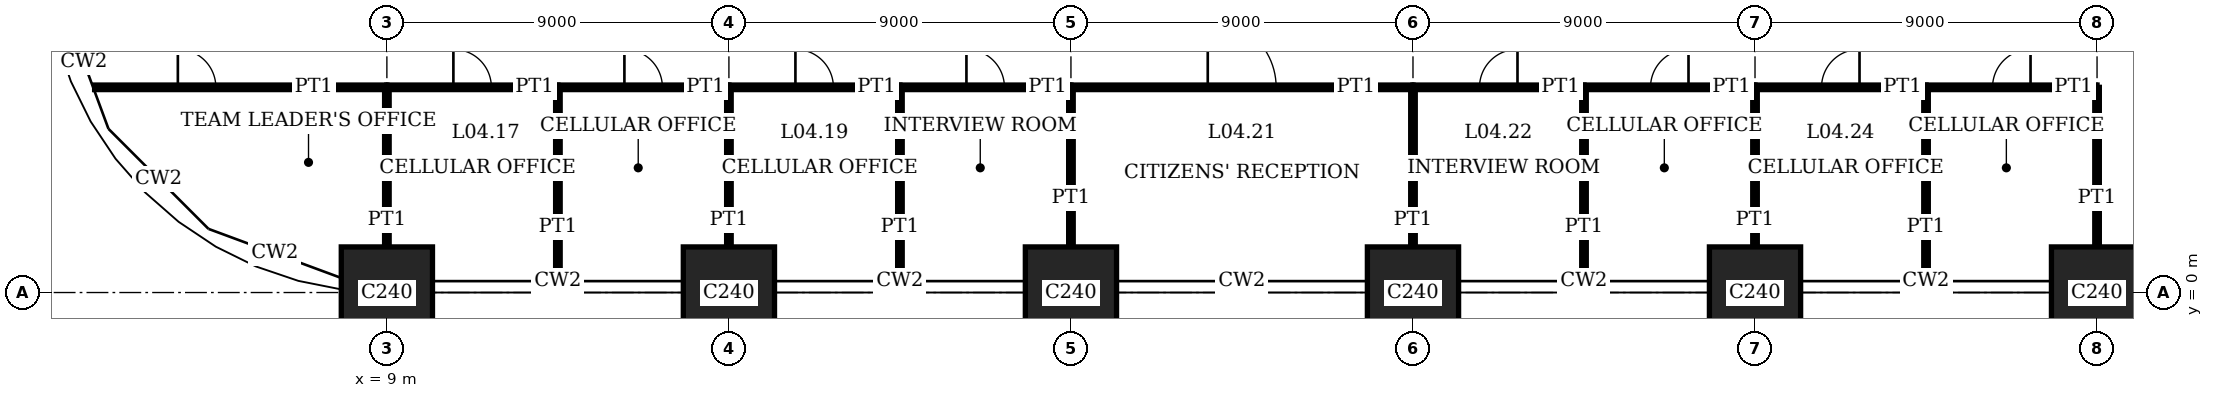
"""IFC4 building model, lengths in metres.
Left out: names, types, materials, properties, quantities, classifications, styles, units other than length and angle.
Written with IfcOpenShell. Run it as: python <this file> out.ifc"""

import sys

from ifc_helpers import new_model, si_unit, direction, frame, frame_2d, origin, origin_2d, place, context, subcontext, project, spatial, rectangle, extrude, element, fill, save


model = new_model("IFC4")
c1 = context("Model", 3, precision=1e-05, world=origin(), true_north=direction((0.0, 1.0)))
c2 = subcontext(c1, "Body", "Model", "MODEL_VIEW")
j1 = project(units=[si_unit("LENGTHUNIT", "METRE"), si_unit("PLANEANGLEUNIT", "RADIAN")], contexts=[c1])
p1 = place(None, origin())
s1 = spatial("IfcSite", under=j1, at=p1, CompositionType="ELEMENT")
p2 = place(p1, origin())
s2 = spatial("IfcBuilding", under=s1, at=p2, CompositionType="ELEMENT")
p3 = place(p2, frame((0.0, 0.0, 19.8)))
s3 = spatial("IfcBuildingStorey", under=s2, at=p3, CompositionType="ELEMENT", Elevation=19.8)
for number, where, z_axis, x_axis in (
    (1, (9.0, 0.0, 0.0), (0.0, 0.0, 1.0), (1.0, 0.0, 0.0)),
    (2, (18.0, 0.0, 0.0), (0.0, 0.0, 1.0), (1.0, 0.0, 0.0)),
    (3, (27.0, 0.0, 0.0), (0.0, 0.0, 1.0), (1.0, 0.0, 0.0)),
    (4, (36.0, 0.0, 0.0), (0.0, 0.0, 1.0), (1.0, 0.0, 0.0)),
    (5, (45.0, 0.0, 0.0), (0.0, 0.0, 1.0), (1.0, 0.0, 0.0)),
    (6, (54.0, 0.0, 0.0), (0.0, 0.0, 1.0), (1.0, 0.0, 0.0)),
):
    element("IfcColumn", number, at=place(p3, frame(where, z_axis=z_axis, x_axis=x_axis)), inside=s3, PredefinedType="COLUMN", context=c2, shape_type="SweptSolid", body=[
        extrude(rectangle(XDim=2.4, YDim=2.4, at=origin_2d()), origin(), (0.0, 0.0, 1.0), 4.0),
    ])
p4 = place(p3, frame((9.0, 5.4, 0.0), z_axis=(0.0, 0.0, 1.0), x_axis=(1.0, 0.0, 0.0)))
e7 = element("IfcWall", 7, at=p4, inside=s3, PredefinedType="PARTITIONING", context=c2, shape_type="SweptSolid", body=[
    extrude(rectangle(XDim=4.5, YDim=0.12, at=frame_2d((2.25, 0.0))), origin(), (0.0, 0.0, 1.0), 3.75),
])
p5 = place(p4, frame((1.75, 0.0, 0.0)))
e8 = element("IfcOpeningElement", 8, at=p5, cuts=e7, PredefinedType="OPENING", context=c2, shape_type="SweptSolid", body=[
    extrude(rectangle(XDim=1.0, YDim=2.4, at=frame_2d((0.5, 1.2))), frame((0.0, 0.07, 0.0), z_axis=(0.0, -1.0, 0.0), x_axis=(1.0, 0.0, 0.0)), (0.0, 0.0, 1.0), 0.14),
])
p6 = place(p3, frame((13.5, 5.4, 0.0), z_axis=(0.0, 0.0, 1.0), x_axis=(1.0, 0.0, 0.0)))
e9 = element("IfcWall", 9, at=p6, inside=s3, PredefinedType="PARTITIONING", context=c2, shape_type="SweptSolid", body=[
    extrude(rectangle(XDim=4.5, YDim=0.12, at=frame_2d((2.25, 0.0))), origin(), (0.0, 0.0, 1.0), 3.75),
])
p7 = place(p6, frame((1.75, 0.0, 0.0)))
e10 = element("IfcOpeningElement", 10, at=p7, cuts=e9, PredefinedType="OPENING", context=c2, shape_type="SweptSolid", body=[
    extrude(rectangle(XDim=1.0, YDim=2.4, at=frame_2d((0.5, 1.2))), frame((0.0, 0.07, 0.0), z_axis=(0.0, -1.0, 0.0), x_axis=(1.0, 0.0, 0.0)), (0.0, 0.0, 1.0), 0.14),
])
p8 = place(p3, frame((18.0, 5.4, 0.0), z_axis=(0.0, 0.0, 1.0), x_axis=(1.0, 0.0, 0.0)))
e11 = element("IfcWall", 11, at=p8, inside=s3, PredefinedType="PARTITIONING", context=c2, shape_type="SweptSolid", body=[
    extrude(rectangle(XDim=4.5, YDim=0.12, at=frame_2d((2.25, 0.0))), origin(), (0.0, 0.0, 1.0), 3.75),
])
p9 = place(p8, frame((1.75, 0.0, 0.0)))
e12 = element("IfcOpeningElement", 12, at=p9, cuts=e11, PredefinedType="OPENING", context=c2, shape_type="SweptSolid", body=[
    extrude(rectangle(XDim=1.0, YDim=2.4, at=frame_2d((0.5, 1.2))), frame((0.0, 0.07, 0.0), z_axis=(0.0, -1.0, 0.0), x_axis=(1.0, 0.0, 0.0)), (0.0, 0.0, 1.0), 0.14),
])
p10 = place(p3, frame((22.5, 5.4, 0.0), z_axis=(0.0, 0.0, 1.0), x_axis=(1.0, 0.0, 0.0)))
e13 = element("IfcWall", 13, at=p10, inside=s3, PredefinedType="PARTITIONING", context=c2, shape_type="SweptSolid", body=[
    extrude(rectangle(XDim=4.5, YDim=0.12, at=frame_2d((2.25, 0.0))), origin(), (0.0, 0.0, 1.0), 3.75),
])
p11 = place(p10, frame((1.75, 0.0, 0.0)))
e14 = element("IfcOpeningElement", 14, at=p11, cuts=e13, PredefinedType="OPENING", context=c2, shape_type="SweptSolid", body=[
    extrude(rectangle(XDim=1.0, YDim=2.4, at=frame_2d((0.5, 1.2))), frame((0.0, 0.07, 0.0), z_axis=(0.0, -1.0, 0.0), x_axis=(1.0, 0.0, 0.0)), (0.0, 0.0, 1.0), 0.14),
])
p12 = place(p3, frame((27.0, 5.4, 0.0), z_axis=(0.0, 0.0, 1.0), x_axis=(1.0, 0.0, 0.0)))
e15 = element("IfcWall", 15, at=p12, inside=s3, PredefinedType="PARTITIONING", context=c2, shape_type="SweptSolid", body=[
    extrude(rectangle(XDim=9.0, YDim=0.12, at=frame_2d((4.5, 0.0))), origin(), (0.0, 0.0, 1.0), 3.75),
])
p13 = place(p12, frame((3.6, 0.0, 0.0)))
e16 = element("IfcOpeningElement", 16, at=p13, cuts=e15, PredefinedType="OPENING", context=c2, shape_type="SweptSolid", body=[
    extrude(rectangle(XDim=1.8, YDim=2.4, at=frame_2d((0.9, 1.2))), frame((0.0, 0.07, 0.0), z_axis=(0.0, -1.0, 0.0), x_axis=(1.0, 0.0, 0.0)), (0.0, 0.0, 1.0), 0.14),
])
p14 = place(p3, frame((36.0, 5.4, 0.0), z_axis=(0.0, 0.0, 1.0), x_axis=(1.0, 0.0, 0.0)))
e17 = element("IfcWall", 17, at=p14, inside=s3, PredefinedType="PARTITIONING", context=c2, shape_type="SweptSolid", body=[
    extrude(rectangle(XDim=4.5, YDim=0.12, at=frame_2d((2.25, 0.0))), origin(), (0.0, 0.0, 1.0), 3.75),
])
p15 = place(p14, frame((1.75, 0.0, 0.0)))
e18 = element("IfcOpeningElement", 18, at=p15, cuts=e17, PredefinedType="OPENING", context=c2, shape_type="SweptSolid", body=[
    extrude(rectangle(XDim=1.0, YDim=2.4, at=frame_2d((0.5, 1.2))), frame((0.0, 0.07, 0.0), z_axis=(0.0, -1.0, 0.0), x_axis=(1.0, 0.0, 0.0)), (0.0, 0.0, 1.0), 0.14),
])
p16 = place(p3, frame((40.5, 5.4, 0.0), z_axis=(0.0, 0.0, 1.0), x_axis=(1.0, 0.0, 0.0)))
e19 = element("IfcWall", 19, at=p16, inside=s3, PredefinedType="PARTITIONING", context=c2, shape_type="SweptSolid", body=[
    extrude(rectangle(XDim=4.5, YDim=0.12, at=frame_2d((2.25, 0.0))), origin(), (0.0, 0.0, 1.0), 3.75),
])
p17 = place(p16, frame((1.75, 0.0, 0.0)))
e20 = element("IfcOpeningElement", 20, at=p17, cuts=e19, PredefinedType="OPENING", context=c2, shape_type="SweptSolid", body=[
    extrude(rectangle(XDim=1.0, YDim=2.4, at=frame_2d((0.5, 1.2))), frame((0.0, 0.07, 0.0), z_axis=(0.0, -1.0, 0.0), x_axis=(1.0, 0.0, 0.0)), (0.0, 0.0, 1.0), 0.14),
])
p18 = place(p3, frame((45.0, 5.4, 0.0), z_axis=(0.0, 0.0, 1.0), x_axis=(1.0, 0.0, 0.0)))
e21 = element("IfcWall", 21, at=p18, inside=s3, PredefinedType="PARTITIONING", context=c2, shape_type="SweptSolid", body=[
    extrude(rectangle(XDim=4.5, YDim=0.12, at=frame_2d((2.25, 0.0))), origin(), (0.0, 0.0, 1.0), 3.75),
])
p19 = place(p18, frame((1.75, 0.0, 0.0)))
e22 = element("IfcOpeningElement", 22, at=p19, cuts=e21, PredefinedType="OPENING", context=c2, shape_type="SweptSolid", body=[
    extrude(rectangle(XDim=1.0, YDim=2.4, at=frame_2d((0.5, 1.2))), frame((0.0, 0.07, 0.0), z_axis=(0.0, -1.0, 0.0), x_axis=(1.0, 0.0, 0.0)), (0.0, 0.0, 1.0), 0.14),
])
p20 = place(p3, frame((49.5, 5.4, 0.0), z_axis=(0.0, 0.0, 1.0), x_axis=(1.0, 0.0, 0.0)))
e23 = element("IfcWall", 23, at=p20, inside=s3, PredefinedType="PARTITIONING", context=c2, shape_type="SweptSolid", body=[
    extrude(rectangle(XDim=4.5, YDim=0.12, at=frame_2d((2.25, 0.0))), origin(), (0.0, 0.0, 1.0), 3.75),
])
p21 = place(p20, frame((1.75, 0.0, 0.0)))
e24 = element("IfcOpeningElement", 24, at=p21, cuts=e23, PredefinedType="OPENING", context=c2, shape_type="SweptSolid", body=[
    extrude(rectangle(XDim=1.0, YDim=2.4, at=frame_2d((0.5, 1.2))), frame((0.0, 0.07, 0.0), z_axis=(0.0, -1.0, 0.0), x_axis=(1.0, 0.0, 0.0)), (0.0, 0.0, 1.0), 0.14),
])
p22 = place(p3, frame((1.31, 5.4, 0.0), z_axis=(0.0, 0.0, 1.0), x_axis=(1.0, 0.0, 0.0)))
e25 = element("IfcWall", 25, at=p22, inside=s3, PredefinedType="PARTITIONING", context=c2, shape_type="SweptSolid", body=[
    extrude(rectangle(XDim=7.69, YDim=0.12, at=frame_2d((3.845, 0.0))), origin(), (0.0, 0.0, 1.0), 3.75),
])
p23 = place(p22, frame((2.19, 0.0, 0.0)))
e26 = element("IfcOpeningElement", 26, at=p23, cuts=e25, PredefinedType="OPENING", context=c2, shape_type="SweptSolid", body=[
    extrude(rectangle(XDim=1.0, YDim=2.4, at=frame_2d((0.5, 1.2))), frame((0.0, 0.07, 0.0), z_axis=(0.0, -1.0, 0.0), x_axis=(1.0, 0.0, 0.0)), (0.0, 0.0, 1.0), 0.14),
])
p24 = place(p3, frame((9.0, 1.2, 0.0), z_axis=(0.0, 0.0, 1.0), x_axis=(0.0, 1.0, 0.0)))
e27 = element("IfcWall", 27, at=p24, inside=s3, PredefinedType="PARTITIONING", context=c2, shape_type="SweptSolid", body=[
    extrude(rectangle(XDim=4.2, YDim=0.12, at=frame_2d((2.1, 0.0))), origin(), (0.0, 0.0, 1.0), 3.05),
])
p25 = place(p3, frame((13.5, 0.31, 0.0), z_axis=(0.0, 0.0, 1.0), x_axis=(0.0, 1.0, 0.0)))
e28 = element("IfcWall", 28, at=p25, inside=s3, PredefinedType="PARTITIONING", context=c2, shape_type="SweptSolid", body=[
    extrude(rectangle(XDim=5.09, YDim=0.12, at=frame_2d((2.545, 0.0))), origin(), (0.0, 0.0, 1.0), 3.75),
])
p26 = place(p3, frame((18.0, 1.2, 0.0), z_axis=(0.0, 0.0, 1.0), x_axis=(0.0, 1.0, 0.0)))
e29 = element("IfcWall", 29, at=p26, inside=s3, PredefinedType="PARTITIONING", context=c2, shape_type="SweptSolid", body=[
    extrude(rectangle(XDim=4.2, YDim=0.12, at=frame_2d((2.1, 0.0))), origin(), (0.0, 0.0, 1.0), 3.05),
])
p27 = place(p3, frame((22.5, 0.31, 0.0), z_axis=(0.0, 0.0, 1.0), x_axis=(0.0, 1.0, 0.0)))
e30 = element("IfcWall", 30, at=p27, inside=s3, PredefinedType="PARTITIONING", context=c2, shape_type="SweptSolid", body=[
    extrude(rectangle(XDim=5.09, YDim=0.12, at=frame_2d((2.545, 0.0))), origin(), (0.0, 0.0, 1.0), 3.75),
])
for number, where, z_axis, x_axis in (
    (31, (27.0, 1.2, 0.0), (0.0, 0.0, 1.0), (0.0, 1.0, 0.0)),
    (32, (36.0, 1.2, 0.0), (0.0, 0.0, 1.0), (0.0, 1.0, 0.0)),
):
    element("IfcWall", number, at=place(p3, frame(where, z_axis=z_axis, x_axis=x_axis)), inside=s3, PredefinedType="PARTITIONING", context=c2, shape_type="SweptSolid", body=[
        extrude(rectangle(XDim=4.2, YDim=0.12, at=frame_2d((2.1, 0.0))), origin(), (0.0, 0.0, 1.0), 3.05),
    ])
p28 = place(p3, frame((40.5, 0.31, 0.0), z_axis=(0.0, 0.0, 1.0), x_axis=(0.0, 1.0, 0.0)))
e33 = element("IfcWall", 33, at=p28, inside=s3, PredefinedType="PARTITIONING", context=c2, shape_type="SweptSolid", body=[
    extrude(rectangle(XDim=5.09, YDim=0.12, at=frame_2d((2.545, 0.0))), origin(), (0.0, 0.0, 1.0), 3.75),
])
p29 = place(p3, frame((45.0, 1.2, 0.0), z_axis=(0.0, 0.0, 1.0), x_axis=(0.0, 1.0, 0.0)))
e34 = element("IfcWall", 34, at=p29, inside=s3, PredefinedType="PARTITIONING", context=c2, shape_type="SweptSolid", body=[
    extrude(rectangle(XDim=4.2, YDim=0.12, at=frame_2d((2.1, 0.0))), origin(), (0.0, 0.0, 1.0), 3.05),
])
p30 = place(p3, frame((49.5, 0.31, 0.0), z_axis=(0.0, 0.0, 1.0), x_axis=(0.0, 1.0, 0.0)))
e35 = element("IfcWall", 35, at=p30, inside=s3, PredefinedType="PARTITIONING", context=c2, shape_type="SweptSolid", body=[
    extrude(rectangle(XDim=5.09, YDim=0.12, at=frame_2d((2.545, 0.0))), origin(), (0.0, 0.0, 1.0), 3.75),
])
p31 = place(p3, frame((54.0, 1.2, 0.0), z_axis=(0.0, 0.0, 1.0), x_axis=(0.0, 1.0, 0.0)))
e36 = element("IfcWall", 36, at=p31, inside=s3, PredefinedType="PARTITIONING", context=c2, shape_type="SweptSolid", body=[
    extrude(rectangle(XDim=4.2, YDim=0.12, at=frame_2d((2.1, 0.0))), origin(), (0.0, 0.0, 1.0), 3.05),
])
p32 = place(p5, origin())
e37 = element("IfcDoor", 37, at=p32, inside=s3, OperationType="SINGLE_SWING_RIGHT", PredefinedType="DOOR", context=c2, shape_type="SweptSolid", body=[
    extrude(rectangle(XDim=1.0, YDim=2.4, at=frame_2d((0.5, 1.2))), frame((0.0, 0.025, 0.0), z_axis=(0.0, -1.0, 0.0), x_axis=(1.0, 0.0, 0.0)), (0.0, 0.0, 1.0), 0.05),
])
fill(e8, e37)
p33 = place(p7, origin())
e38 = element("IfcDoor", 38, at=p33, inside=s3, OperationType="SINGLE_SWING_RIGHT", PredefinedType="DOOR", context=c2, shape_type="SweptSolid", body=[
    extrude(rectangle(XDim=1.0, YDim=2.4, at=frame_2d((0.5, 1.2))), frame((0.0, 0.025, 0.0), z_axis=(0.0, -1.0, 0.0), x_axis=(1.0, 0.0, 0.0)), (0.0, 0.0, 1.0), 0.05),
])
fill(e10, e38)
p34 = place(p9, origin())
e39 = element("IfcDoor", 39, at=p34, inside=s3, OperationType="SINGLE_SWING_RIGHT", PredefinedType="DOOR", context=c2, shape_type="SweptSolid", body=[
    extrude(rectangle(XDim=1.0, YDim=2.4, at=frame_2d((0.5, 1.2))), frame((0.0, 0.025, 0.0), z_axis=(0.0, -1.0, 0.0), x_axis=(1.0, 0.0, 0.0)), (0.0, 0.0, 1.0), 0.05),
])
fill(e12, e39)
p35 = place(p11, origin())
e40 = element("IfcDoor", 40, at=p35, inside=s3, OperationType="SINGLE_SWING_RIGHT", PredefinedType="DOOR", context=c2, shape_type="SweptSolid", body=[
    extrude(rectangle(XDim=1.0, YDim=2.4, at=frame_2d((0.5, 1.2))), frame((0.0, 0.025, 0.0), z_axis=(0.0, -1.0, 0.0), x_axis=(1.0, 0.0, 0.0)), (0.0, 0.0, 1.0), 0.05),
])
fill(e14, e40)
p36 = place(p13, origin())
e41 = element("IfcDoor", 41, at=p36, inside=s3, OperationType="DOUBLE_DOOR_SINGLE_SWING", PredefinedType="DOOR", context=c2, shape_type="SweptSolid", body=[
    extrude(rectangle(XDim=1.8, YDim=2.4, at=frame_2d((0.9, 1.2))), frame((0.0, 0.025, 0.0), z_axis=(0.0, -1.0, 0.0), x_axis=(1.0, 0.0, 0.0)), (0.0, 0.0, 1.0), 0.05),
])
fill(e16, e41)
p37 = place(p15, origin())
e42 = element("IfcDoor", 42, at=p37, inside=s3, OperationType="SINGLE_SWING_LEFT", PredefinedType="DOOR", context=c2, shape_type="SweptSolid", body=[
    extrude(rectangle(XDim=1.0, YDim=2.4, at=frame_2d((0.5, 1.2))), frame((0.0, 0.025, 0.0), z_axis=(0.0, -1.0, 0.0), x_axis=(1.0, 0.0, 0.0)), (0.0, 0.0, 1.0), 0.05),
])
fill(e18, e42)
p38 = place(p17, origin())
e43 = element("IfcDoor", 43, at=p38, inside=s3, OperationType="SINGLE_SWING_LEFT", PredefinedType="DOOR", context=c2, shape_type="SweptSolid", body=[
    extrude(rectangle(XDim=1.0, YDim=2.4, at=frame_2d((0.5, 1.2))), frame((0.0, 0.025, 0.0), z_axis=(0.0, -1.0, 0.0), x_axis=(1.0, 0.0, 0.0)), (0.0, 0.0, 1.0), 0.05),
])
fill(e20, e43)
p39 = place(p19, origin())
e44 = element("IfcDoor", 44, at=p39, inside=s3, OperationType="SINGLE_SWING_LEFT", PredefinedType="DOOR", context=c2, shape_type="SweptSolid", body=[
    extrude(rectangle(XDim=1.0, YDim=2.4, at=frame_2d((0.5, 1.2))), frame((0.0, 0.025, 0.0), z_axis=(0.0, -1.0, 0.0), x_axis=(1.0, 0.0, 0.0)), (0.0, 0.0, 1.0), 0.05),
])
fill(e22, e44)
p40 = place(p21, origin())
e45 = element("IfcDoor", 45, at=p40, inside=s3, OperationType="SINGLE_SWING_LEFT", PredefinedType="DOOR", context=c2, shape_type="SweptSolid", body=[
    extrude(rectangle(XDim=1.0, YDim=2.4, at=frame_2d((0.5, 1.2))), frame((0.0, 0.025, 0.0), z_axis=(0.0, -1.0, 0.0), x_axis=(1.0, 0.0, 0.0)), (0.0, 0.0, 1.0), 0.05),
])
fill(e24, e45)
p41 = place(p23, origin())
e46 = element("IfcDoor", 46, at=p41, inside=s3, OperationType="SINGLE_SWING_RIGHT", PredefinedType="DOOR", context=c2, shape_type="SweptSolid", body=[
    extrude(rectangle(XDim=1.0, YDim=2.4, at=frame_2d((0.5, 1.2))), frame((0.0, 0.025, 0.0), z_axis=(0.0, -1.0, 0.0), x_axis=(1.0, 0.0, 0.0)), (0.0, 0.0, 1.0), 0.05),
])
fill(e26, e46)
save(model, sys.argv[1])
